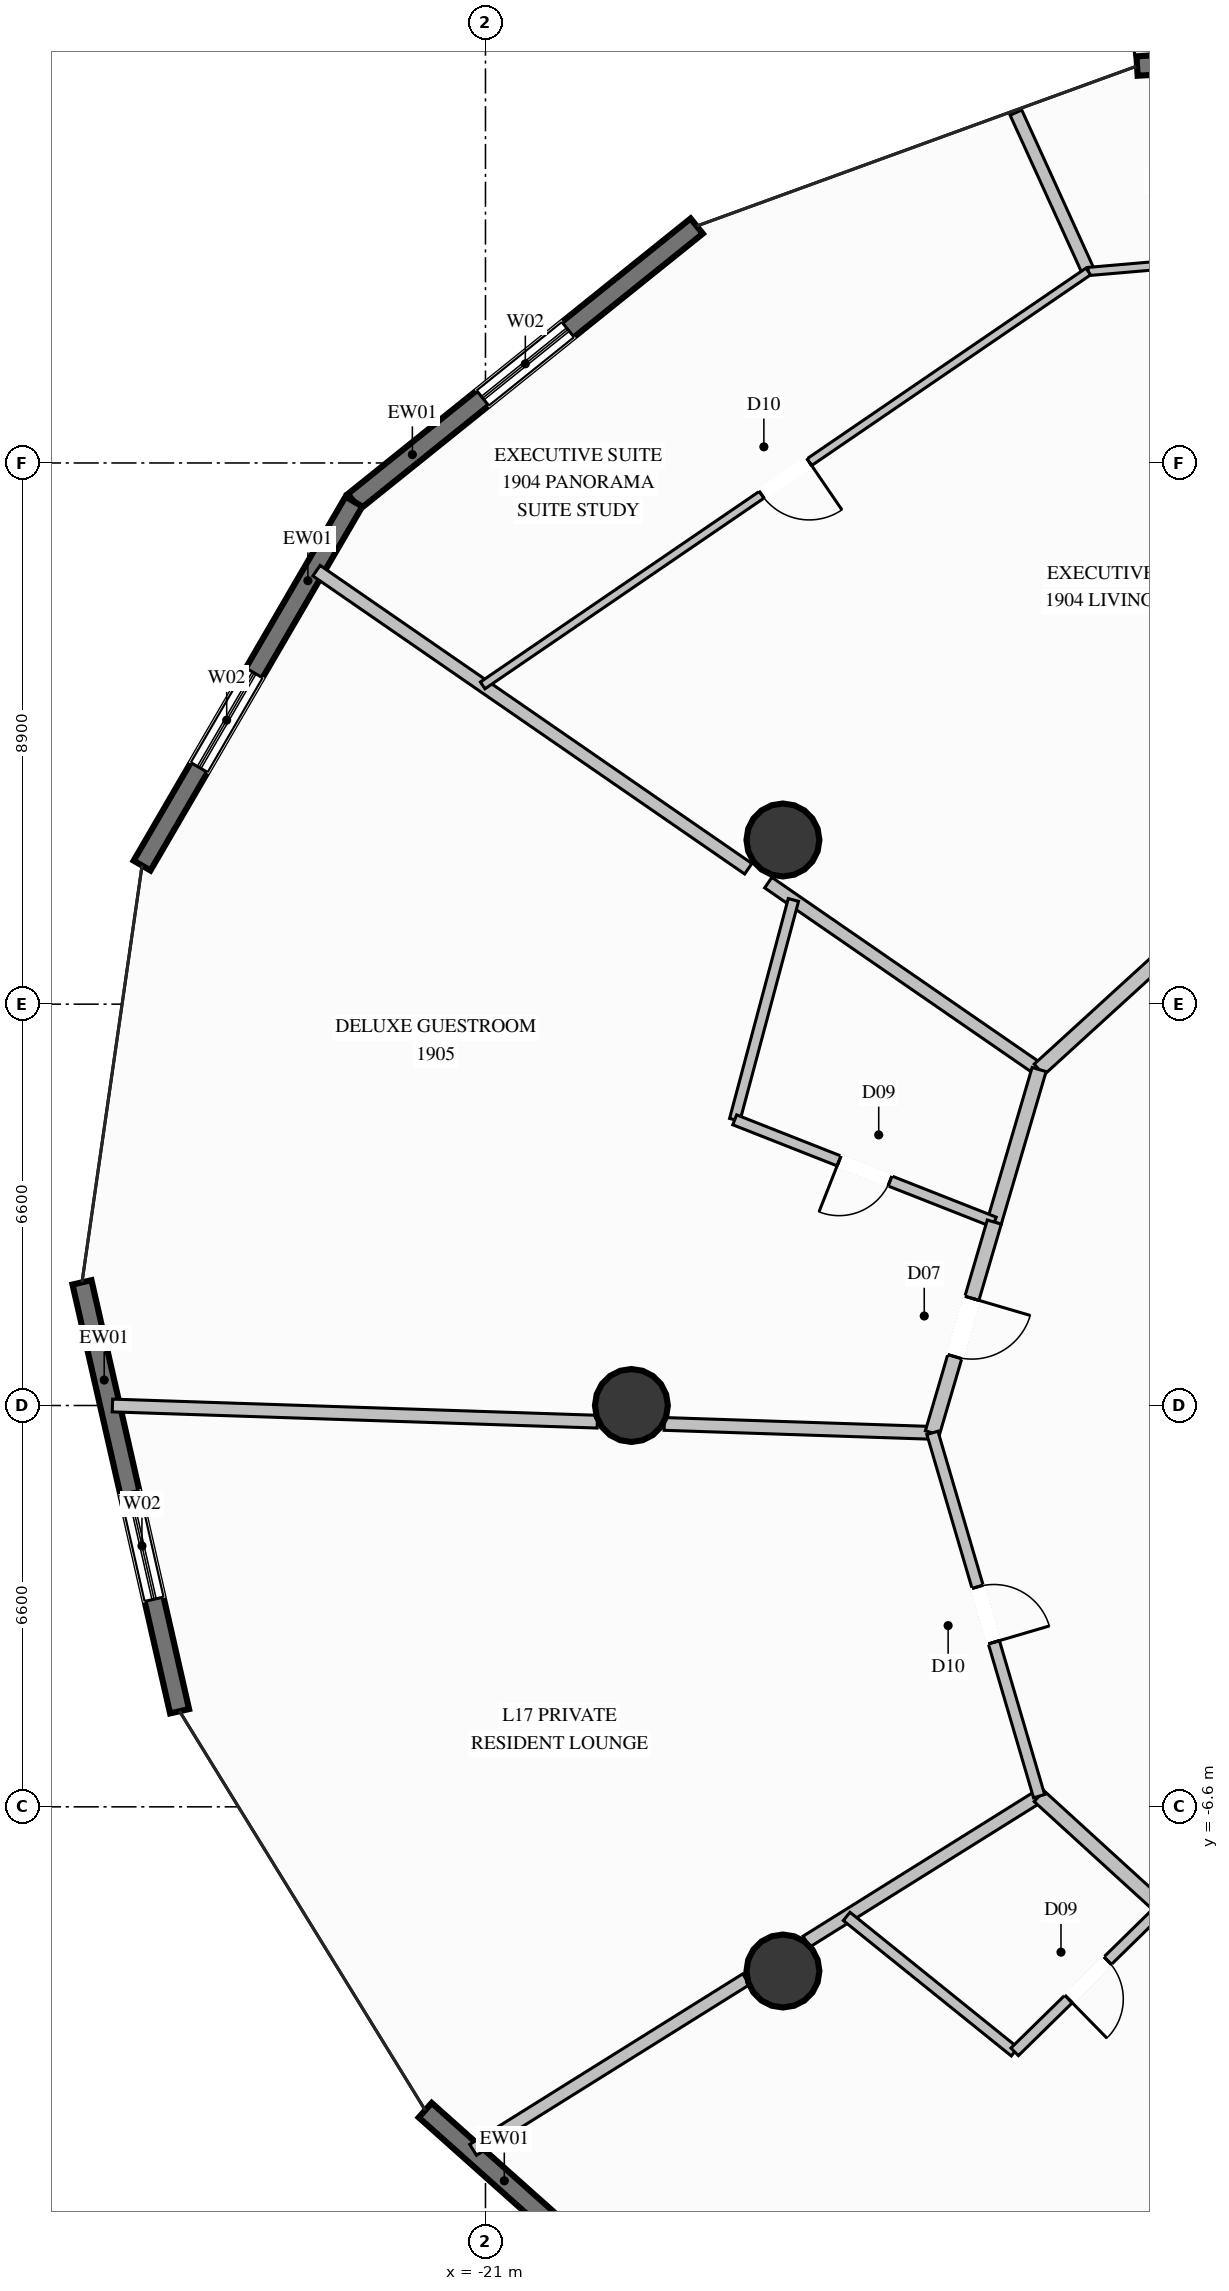
"""IFC4 building model, lengths in metres.
Left out: names, types, materials, properties, quantities, classifications, styles, units other than length and angle.
Written with IfcOpenShell. Run it as: python <this file> out.ifc"""

import sys

from ifc_helpers import new_model, si_unit, direction, frame, frame_2d, origin, origin_2d, place, context, subcontext, project, spatial, rectangle, circle, extrude, element, fill, save


model = new_model("IFC4")
c1 = context("Model", 3, precision=1e-05, world=origin(), true_north=direction((0.0, 1.0)))
c2 = subcontext(c1, "Body", "Model", "MODEL_VIEW")
j1 = project(units=[si_unit("LENGTHUNIT", "METRE"), si_unit("PLANEANGLEUNIT", "RADIAN")], contexts=[c1])
p1 = place(None, origin())
s1 = spatial("IfcSite", under=j1, at=p1, CompositionType="ELEMENT")
p2 = place(p1, origin())
s2 = spatial("IfcBuilding", under=s1, at=p2, CompositionType="ELEMENT")
p3 = place(p2, frame((0.0, 0.0, 71.6)))
s3 = spatial("IfcBuildingStorey", under=s2, at=p3, CompositionType="ELEMENT", Elevation=71.6)
for number, where, z_axis, x_axis in (
    (1, (-16.108, 9.3, 0.0), (0.0, 0.0, 1.0), (1.0, 0.0, 0.0)),
    (2, (-18.6, 0.0, 0.0), (0.0, 0.0, 1.0), (1.0, 0.0, 0.0)),
    (3, (-16.108, -9.3, 0.0), (0.0, 0.0, 1.0), (1.0, 0.0, 0.0)),
):
    element("IfcColumn", number, at=place(p3, frame(where, z_axis=z_axis, x_axis=x_axis)), inside=s3, PredefinedType="COLUMN", context=c2, shape_type="SweptSolid", body=[
        extrude(circle(Radius=0.6, at=origin_2d()), origin(), (0.0, 0.0, 1.0), 3.6),
    ])
p4 = place(p3, frame((-10.284, 22.028, 0.0), z_axis=(0.0, 0.0, 1.0), x_axis=(0.998301126335, 0.058265437081, 0.0)))
e4 = element("IfcWall", 4, at=p4, inside=s3, PredefinedType="SOLIDWALL", context=c2, shape_type="SweptSolid", body=[
    extrude(rectangle(XDim=8.15, YDim=0.32, at=frame_2d((4.075, 0.0))), origin(), (0.0, 0.0, 1.0), 3.34),
])
p5 = place(p4, frame((3.175, 0.0, 0.35)))
e5 = element("IfcOpeningElement", 5, at=p5, cuts=e4, PredefinedType="OPENING", context=c2, shape_type="SweptSolid", body=[
    extrude(rectangle(XDim=1.8, YDim=2.6, at=frame_2d((0.9, 1.3))), frame((0.0, 0.17, 0.0), z_axis=(0.0, -1.0, 0.0), x_axis=(1.0, 0.0, 0.0)), (0.0, 0.0, 1.0), 0.34),
])
p6 = place(p3, frame((-23.164, 14.865, 0.0), z_axis=(0.0, 0.0, 1.0), x_axis=(0.779487156213, 0.626418209585, 0.0)))
e6 = element("IfcWall", 6, at=p6, inside=s3, PredefinedType="SOLIDWALL", context=c2, shape_type="SweptSolid", body=[
    extrude(rectangle(XDim=7.233, YDim=0.32, at=frame_2d((3.617, 0.0))), origin(), (0.0, 0.0, 1.0), 3.34),
])
p7 = place(p6, frame((2.717, 0.0, 0.35)))
e7 = element("IfcOpeningElement", 7, at=p7, cuts=e6, PredefinedType="OPENING", context=c2, shape_type="SweptSolid", body=[
    extrude(rectangle(XDim=1.8, YDim=2.6, at=frame_2d((0.9, 1.3))), frame((0.0, 0.17, 0.0), z_axis=(0.0, -1.0, 0.0), x_axis=(1.0, 0.0, 0.0)), (0.0, 0.0, 1.0), 0.34),
])
p8 = place(p3, frame((-26.648, 8.879, 0.0), z_axis=(0.0, 0.0, 1.0), x_axis=(0.503009446837, 0.864280912894, 0.0)))
e8 = element("IfcWall", 8, at=p8, inside=s3, PredefinedType="SOLIDWALL", context=c2, shape_type="SweptSolid", body=[
    extrude(rectangle(XDim=6.926, YDim=0.32, at=frame_2d((3.463, 0.0))), origin(), (0.0, 0.0, 1.0), 3.34),
])
p9 = place(p8, frame((1.867, 0.0, 0.35)))
e9 = element("IfcOpeningElement", 9, at=p9, cuts=e8, PredefinedType="OPENING", context=c2, shape_type="SweptSolid", body=[
    extrude(rectangle(XDim=1.8, YDim=2.6, at=frame_2d((0.9, 1.3))), frame((0.0, 0.17, 0.0), z_axis=(0.0, -1.0, 0.0), x_axis=(1.0, 0.0, 0.0)), (0.0, 0.0, 1.0), 0.34),
])
p10 = place(p3, frame((-26.031, -5.028, 0.0), z_axis=(0.0, 0.0, 1.0), x_axis=(-0.221888063911, 0.975072144558, 0.0)))
e10 = element("IfcWall", 10, at=p10, inside=s3, PredefinedType="SOLIDWALL", context=c2, shape_type="SweptSolid", body=[
    extrude(rectangle(XDim=7.233, YDim=0.32, at=frame_2d((3.617, 0.0))), origin(), (0.0, 0.0, 1.0), 3.34),
])
p11 = place(p10, frame((1.889, 0.0, 0.35)))
e11 = element("IfcOpeningElement", 11, at=p11, cuts=e10, PredefinedType="OPENING", context=c2, shape_type="SweptSolid", body=[
    extrude(rectangle(XDim=1.8, YDim=2.6, at=frame_2d((0.9, 1.3))), frame((0.0, 0.17, 0.0), z_axis=(0.0, -1.0, 0.0), x_axis=(1.0, 0.0, 0.0)), (0.0, 0.0, 1.0), 0.34),
])
p12 = place(p3, frame((-15.91, -17.016, 0.0), z_axis=(0.0, 0.0, 1.0), x_axis=(-0.746090706356, 0.665844319559, 0.0)))
e12 = element("IfcWall", 12, at=p12, inside=s3, PredefinedType="SOLIDWALL", context=c2, shape_type="SweptSolid", body=[
    extrude(rectangle(XDim=8.151, YDim=0.32, at=frame_2d((4.075, 0.0))), origin(), (0.0, 0.0, 1.0), 3.34),
])
p13 = place(p12, frame((2.614, 0.0, 0.35)))
e13 = element("IfcOpeningElement", 13, at=p13, cuts=e12, PredefinedType="OPENING", context=c2, shape_type="SweptSolid", body=[
    extrude(rectangle(XDim=1.8, YDim=2.6, at=frame_2d((0.9, 1.3))), frame((0.0, 0.17, 0.0), z_axis=(0.0, -1.0, 0.0), x_axis=(1.0, 0.0, 0.0)), (0.0, 0.0, 1.0), 0.34),
])
p14 = place(p3, frame((-11.895, 5.525, 0.0), z_axis=(0.0, 0.0, 1.0), x_axis=(-0.823003351356, 0.56803651613, 0.0)))
e14 = element("IfcWall", 14, at=p14, inside=s3, PredefinedType="PARTITIONING", context=c2, shape_type="SweptSolid", body=[
    extrude(rectangle(XDim=5.412, YDim=0.21, at=frame_2d((2.706, 0.0))), origin(), (0.0, 0.0, 1.0), 3.34),
])
p15 = place(p3, frame((-16.678, 8.827, 0.0), z_axis=(0.0, 0.0, 1.0), x_axis=(-0.822952332907, 0.568110427437, 0.0)))
e15 = element("IfcWall", 15, at=p15, inside=s3, PredefinedType="PARTITIONING", context=c2, shape_type="SweptSolid", body=[
    extrude(rectangle(XDim=8.629, YDim=0.21, at=frame_2d((4.314, 0.0))), origin(), (0.0, 0.0, 1.0), 3.34),
])
p16 = place(p3, frame((-13.65, -0.45, 0.0), z_axis=(0.0, 0.0, 1.0), x_axis=(-0.999444906979, 0.033314830233, 0.0)))
e16 = element("IfcWall", 16, at=p16, inside=s3, PredefinedType="PARTITIONING", context=c2, shape_type="SweptSolid", body=[
    extrude(rectangle(XDim=4.412, YDim=0.21, at=frame_2d((2.206, 0.0))), origin(), (0.0, 0.0, 1.0), 2.709),
])
p17 = place(p3, frame((-19.16, -0.266, 0.0), z_axis=(0.0, 0.0, 1.0), x_axis=(-0.999443751819, 0.033349467014, 0.0)))
e17 = element("IfcWall", 17, at=p17, inside=s3, PredefinedType="PARTITIONING", context=c2, shape_type="SweptSolid", body=[
    extrude(rectangle(XDim=7.979, YDim=0.21, at=frame_2d((3.99, 0.0))), origin(), (0.0, 0.0, 1.0), 3.34),
])
p18 = place(p3, frame((-11.895, -6.425, 0.0), z_axis=(0.0, 0.0, 1.0), x_axis=(-0.848031743997, -0.529945432261, 0.0)))
e18 = element("IfcWall", 18, at=p18, inside=s3, PredefinedType="PARTITIONING", context=c2, shape_type="SweptSolid", body=[
    extrude(rectangle(XDim=4.511, YDim=0.21, at=frame_2d((2.256, 0.0))), origin(), (0.0, 0.0, 1.0), 2.709),
])
p19 = place(p3, frame((-16.713, -9.435, 0.0), z_axis=(0.0, 0.0, 1.0), x_axis=(-0.848026798321, -0.529953346371, 0.0)))
e19 = element("IfcWall", 19, at=p19, inside=s3, PredefinedType="PARTITIONING", context=c2, shape_type="SweptSolid", body=[
    extrude(rectangle(XDim=5.295, YDim=0.21, at=frame_2d((2.647, 0.0))), origin(), (0.0, 0.0, 1.0), 3.34),
])
p20 = place(p3, frame((-11.895, -6.425, 0.0), z_axis=(0.0, 0.0, 1.0), x_axis=(0.738828610863, -0.673893377153, 0.0)))
e20 = element("IfcWall", 20, at=p20, inside=s3, PredefinedType="PARTITIONING", context=c2, shape_type="SweptSolid", body=[
    extrude(rectangle(XDim=2.726, YDim=0.24, at=frame_2d((1.363, 0.0))), origin(), (0.0, 0.0, 1.0), 3.34),
])
p21 = place(p3, frame((-15.06, -8.402, 0.0), z_axis=(0.0, 0.0, 1.0), x_axis=(0.778601703529, -0.627518435795, 0.0)))
e21 = element("IfcWall", 21, at=p21, inside=s3, PredefinedType="PLUMBINGWALL", context=c2, shape_type="SweptSolid", body=[
    extrude(rectangle(XDim=3.549, YDim=0.175, at=frame_2d((1.774, 0.0))), origin(), (0.0, 0.0, 1.0), 3.34),
])
p22 = place(p3, frame((-9.881, -8.262, 0.0), z_axis=(0.0, 0.0, 1.0), x_axis=(-0.714323969433, -0.699815166093, 0.0)))
e22 = element("IfcWall", 22, at=p22, inside=s3, PredefinedType="PLUMBINGWALL", context=c2, shape_type="SweptSolid", body=[
    extrude(rectangle(XDim=3.382, YDim=0.175, at=frame_2d((1.691, 0.0))), origin(), (0.0, 0.0, 1.0), 3.34),
])
p23 = place(p22, frame((1.241, 0.0, 0.0)))
e23 = element("IfcOpeningElement", 23, at=p23, cuts=e22, PredefinedType="OPENING", context=c2, shape_type="SweptSolid", body=[
    extrude(rectangle(XDim=0.9, YDim=2.1, at=frame_2d((0.45, 1.05))), frame((0.0, 0.098, 0.0), z_axis=(0.0, -1.0, 0.0), x_axis=(1.0, 0.0, 0.0)), (0.0, 0.0, 1.0), 0.195),
])
p24 = place(p3, frame((-11.086, 18.649, 0.0), z_axis=(0.0, 0.0, 1.0), x_axis=(-0.414437075806, 0.910077969296, 0.0)))
e24 = element("IfcWall", 24, at=p24, inside=s3, PredefinedType="PARTITIONING", context=c2, shape_type="SweptSolid", body=[
    extrude(rectangle(XDim=2.871, YDim=0.21, at=frame_2d((1.436, 0.0))), origin(), (0.0, 0.0, 1.0), 3.34),
])
p25 = place(p3, frame((-7.1, 9.899, 0.0), z_axis=(0.0, 0.0, 1.0), x_axis=(-0.73878836807, -0.673937495028, 0.0)))
e25 = element("IfcWall", 25, at=p25, inside=s3, PredefinedType="PARTITIONING", context=c2, shape_type="SweptSolid", body=[
    extrude(rectangle(XDim=6.49, YDim=0.24, at=frame_2d((3.245, 0.0))), origin(), (0.0, 0.0, 1.0), 3.34),
])
p26 = place(p3, frame((-0.127, 19.594, 0.0), z_axis=(0.0, 0.0, 1.0), x_axis=(-0.99630221434, -0.085917970765, 0.0)))
e26 = element("IfcWall", 26, at=p26, inside=s3, PredefinedType="PARTITIONING", context=c2, shape_type="SweptSolid", body=[
    extrude(rectangle(XDim=11.0, YDim=0.135, at=frame_2d((5.5, 0.0))), origin(), (0.0, 0.0, 1.0), 3.34),
])
p27 = place(p26, frame((5.025, 0.0, 0.0)))
e27 = element("IfcOpeningElement", 27, at=p27, cuts=e26, PredefinedType="OPENING", context=c2, shape_type="SweptSolid", body=[
    extrude(rectangle(XDim=0.95, YDim=2.1, at=frame_2d((0.475, 1.05))), frame((0.0, 0.078, 0.0), z_axis=(0.0, -1.0, 0.0), x_axis=(1.0, 0.0, 0.0)), (0.0, 0.0, 1.0), 0.155),
])
p28 = place(p3, frame((-11.086, 18.649, 0.0), z_axis=(0.0, 0.0, 1.0), x_axis=(-0.825609445558, -0.564242007834, 0.0)))
e28 = element("IfcWall", 28, at=p28, inside=s3, PredefinedType="PARTITIONING", context=c2, shape_type="SweptSolid", body=[
    extrude(rectangle(XDim=12.064, YDim=0.135, at=frame_2d((6.032, 0.0))), origin(), (0.0, 0.0, 1.0), 3.34),
])
p29 = place(p28, frame((5.557, 0.0, 0.0)))
e29 = element("IfcOpeningElement", 29, at=p29, cuts=e28, PredefinedType="OPENING", context=c2, shape_type="SweptSolid", body=[
    extrude(rectangle(XDim=0.95, YDim=2.1, at=frame_2d((0.475, 1.05))), frame((0.0, 0.078, 0.0), z_axis=(0.0, -1.0, 0.0), x_axis=(1.0, 0.0, 0.0)), (0.0, 0.0, 1.0), 0.155),
])
p30 = place(p3, frame((-11.895, 5.525, 0.0), z_axis=(0.0, 0.0, 1.0), x_axis=(-0.281878178616, -0.9594502032, 0.0)))
e30 = element("IfcWall", 30, at=p30, inside=s3, PredefinedType="PARTITIONING", context=c2, shape_type="SweptSolid", body=[
    extrude(rectangle(XDim=2.615, YDim=0.24, at=frame_2d((1.307, 0.0))), origin(), (0.0, 0.0, 1.0), 3.34),
])
p31 = place(p3, frame((-15.936, 8.314, 0.0), z_axis=(0.0, 0.0, 1.0), x_axis=(-0.257808817377, -0.966195949941, 0.0)))
e31 = element("IfcWall", 31, at=p31, inside=s3, PredefinedType="PLUMBINGWALL", context=c2, shape_type="SweptSolid", body=[
    extrude(rectangle(XDim=3.742, YDim=0.175, at=frame_2d((1.871, 0.0))), origin(), (0.0, 0.0, 1.0), 2.793),
])
p32 = place(p3, frame((-12.632, 3.016, 0.0), z_axis=(0.0, 0.0, 1.0), x_axis=(-0.930390795805, 0.366569184576, 0.0)))
e32 = element("IfcWall", 32, at=p32, inside=s3, PredefinedType="PLUMBINGWALL", context=c2, shape_type="SweptSolid", body=[
    extrude(rectangle(XDim=4.588, YDim=0.175, at=frame_2d((2.294, 0.0))), origin(), (0.0, 0.0, 1.0), 3.34),
])
p33 = place(p32, frame((1.844, 0.0, 0.0)))
e33 = element("IfcOpeningElement", 33, at=p33, cuts=e32, PredefinedType="OPENING", context=c2, shape_type="SweptSolid", body=[
    extrude(rectangle(XDim=0.9, YDim=2.1, at=frame_2d((0.45, 1.05))), frame((0.0, 0.098, 0.0), z_axis=(0.0, -1.0, 0.0), x_axis=(1.0, 0.0, 0.0)), (0.0, 0.0, 1.0), 0.195),
])
p34 = place(p3, frame((-12.632, 3.016, 0.0), z_axis=(0.0, 0.0, 1.0), x_axis=(-0.281756491287, -0.959485945503, 0.0)))
e34 = element("IfcWall", 34, at=p34, inside=s3, PredefinedType="PARTITIONING", context=c2, shape_type="SweptSolid", body=[
    extrude(rectangle(XDim=3.612, YDim=0.24, at=frame_2d((1.806, 0.0))), origin(), (0.0, 0.0, 1.0), 3.34),
])
p35 = place(p34, frame((1.306, 0.0, 0.0)))
e35 = element("IfcOpeningElement", 35, at=p35, cuts=e34, PredefinedType="OPENING", context=c2, shape_type="SweptSolid", body=[
    extrude(rectangle(XDim=1.0, YDim=2.2, at=frame_2d((0.5, 1.1))), frame((0.0, 0.13, 0.0), z_axis=(0.0, -1.0, 0.0), x_axis=(1.0, 0.0, 0.0)), (0.0, 0.0, 1.0), 0.26),
])
p36 = place(p3, frame((-13.65, -0.45, 0.0), z_axis=(0.0, 0.0, 1.0), x_axis=(0.281796988209, -0.959474052508, 0.0)))
e36 = element("IfcWall", 36, at=p36, inside=s3, PredefinedType="PARTITIONING", context=c2, shape_type="SweptSolid", body=[
    extrude(rectangle(XDim=6.228, YDim=0.19, at=frame_2d((3.114, 0.0))), origin(), (0.0, 0.0, 1.0), 2.917),
])
p37 = place(p36, frame((2.639, 0.0, 0.0)))
e37 = element("IfcOpeningElement", 37, at=p37, cuts=e36, PredefinedType="OPENING", context=c2, shape_type="SweptSolid", body=[
    extrude(rectangle(XDim=0.95, YDim=2.1, at=frame_2d((0.475, 1.05))), frame((0.0, 0.105, 0.0), z_axis=(0.0, -1.0, 0.0), x_axis=(1.0, 0.0, 0.0)), (0.0, 0.0, 1.0), 0.21),
])
p38 = place(p7, origin())
e38 = element("IfcWindow", 38, at=p38, inside=s3, PartitioningType="SINGLE_PANEL", PredefinedType="WINDOW", context=c2, shape_type="SweptSolid", body=[
    extrude(rectangle(XDim=1.8, YDim=2.6, at=frame_2d((0.9, 1.3))), frame((0.0, 0.03, 0.0), z_axis=(0.0, -1.0, 0.0), x_axis=(1.0, 0.0, 0.0)), (0.0, 0.0, 1.0), 0.06),
])
fill(e7, e38)
p39 = place(p9, origin())
e39 = element("IfcWindow", 39, at=p39, inside=s3, PartitioningType="SINGLE_PANEL", PredefinedType="WINDOW", context=c2, shape_type="SweptSolid", body=[
    extrude(rectangle(XDim=1.8, YDim=2.6, at=frame_2d((0.9, 1.3))), frame((0.0, 0.03, 0.0), z_axis=(0.0, -1.0, 0.0), x_axis=(1.0, 0.0, 0.0)), (0.0, 0.0, 1.0), 0.06),
])
fill(e9, e39)
p40 = place(p11, origin())
e40 = element("IfcWindow", 40, at=p40, inside=s3, PartitioningType="SINGLE_PANEL", PredefinedType="WINDOW", context=c2, shape_type="SweptSolid", body=[
    extrude(rectangle(XDim=1.8, YDim=2.6, at=frame_2d((0.9, 1.3))), frame((0.0, 0.03, 0.0), z_axis=(0.0, -1.0, 0.0), x_axis=(1.0, 0.0, 0.0)), (0.0, 0.0, 1.0), 0.06),
])
fill(e11, e40)
p41 = place(p23, origin())
e41 = element("IfcDoor", 41, at=p41, inside=s3, OperationType="SINGLE_SWING_RIGHT", PredefinedType="DOOR", context=c2, shape_type="SweptSolid", body=[
    extrude(rectangle(XDim=0.9, YDim=2.1, at=frame_2d((0.45, 1.05))), frame((0.0, 0.025, 0.0), z_axis=(0.0, -1.0, 0.0), x_axis=(1.0, 0.0, 0.0)), (0.0, 0.0, 1.0), 0.05),
])
fill(e23, e41)
p42 = place(p29, origin())
e42 = element("IfcDoor", 42, at=p42, inside=s3, OperationType="SINGLE_SWING_LEFT", PredefinedType="DOOR", context=c2, shape_type="SweptSolid", body=[
    extrude(rectangle(XDim=0.95, YDim=2.1, at=frame_2d((0.475, 1.05))), frame((0.0, 0.025, 0.0), z_axis=(0.0, -1.0, 0.0), x_axis=(1.0, 0.0, 0.0)), (0.0, 0.0, 1.0), 0.05),
])
fill(e29, e42)
p43 = place(p33, origin())
e43 = element("IfcDoor", 43, at=p43, inside=s3, OperationType="SINGLE_SWING_RIGHT", PredefinedType="DOOR", context=c2, shape_type="SweptSolid", body=[
    extrude(rectangle(XDim=0.9, YDim=2.1, at=frame_2d((0.45, 1.05))), frame((0.0, 0.025, 0.0), z_axis=(0.0, -1.0, 0.0), x_axis=(1.0, 0.0, 0.0)), (0.0, 0.0, 1.0), 0.05),
])
fill(e33, e43)
p44 = place(p35, origin())
e44 = element("IfcDoor", 44, at=p44, inside=s3, OperationType="SINGLE_SWING_LEFT", PredefinedType="DOOR", context=c2, shape_type="SweptSolid", body=[
    extrude(rectangle(XDim=1.0, YDim=2.2, at=frame_2d((0.5, 1.1))), frame((0.0, 0.025, 0.0), z_axis=(0.0, -1.0, 0.0), x_axis=(1.0, 0.0, 0.0)), (0.0, 0.0, 1.0), 0.05),
])
fill(e35, e44)
p45 = place(p37, origin())
e45 = element("IfcDoor", 45, at=p45, inside=s3, OperationType="SINGLE_SWING_RIGHT", PredefinedType="DOOR", context=c2, shape_type="SweptSolid", body=[
    extrude(rectangle(XDim=0.95, YDim=2.1, at=frame_2d((0.475, 1.05))), frame((0.0, 0.025, 0.0), z_axis=(0.0, -1.0, 0.0), x_axis=(1.0, 0.0, 0.0)), (0.0, 0.0, 1.0), 0.05),
])
fill(e37, e45)
save(model, sys.argv[1])
